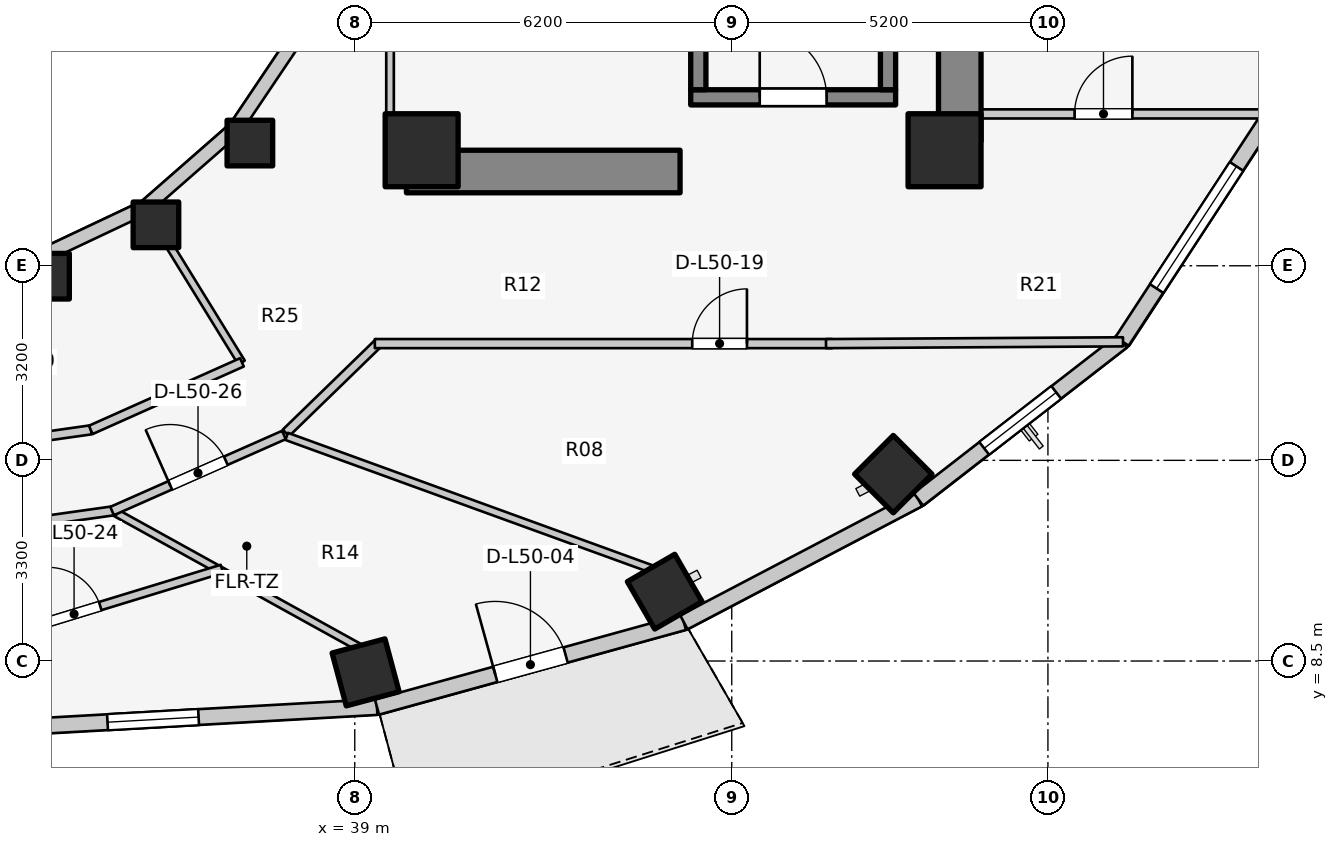
"""IFC4 building model, lengths in metres.
Left out: names, types, materials, properties, quantities, classifications, styles, units other than length and angle.
Written with IfcOpenShell. Run it as: python <this file> out.ifc"""

import sys

from ifc_helpers import new_model, si_unit, direction, frame, frame_2d, origin, origin_2d, place, context, subcontext, project, spatial, rectangle, extrude, element, fill, save


model = new_model("IFC4")
c1 = context("Model", 3, precision=1e-05, world=origin(), true_north=direction((0.0, 1.0)))
c2 = subcontext(c1, "Body", "Model", "MODEL_VIEW")
j1 = project(units=[si_unit("LENGTHUNIT", "METRE"), si_unit("PLANEANGLEUNIT", "RADIAN")], contexts=[c1])
p1 = place(None, origin())
s1 = spatial("IfcSite", under=j1, at=p1, CompositionType="ELEMENT")
p2 = place(p1, origin())
s2 = spatial("IfcBuilding", under=s1, at=p2, CompositionType="ELEMENT")
p3 = place(p2, frame((0.0, 0.0, 165.3)))
s3 = spatial("IfcBuildingStorey", under=s2, at=p3, CompositionType="ELEMENT", Elevation=165.3)
p4 = place(p3, frame((48.95, 17.05, 0.0), z_axis=(0.0, 0.0, 1.0), x_axis=(0.0, 1.0, 0.0)))
e1 = element("IfcWall", 1, at=p4, inside=s3, PredefinedType="SHEAR", context=c2, shape_type="SweptSolid", body=[
    extrude(rectangle(XDim=12.8, YDim=0.7, at=frame_2d((6.4, 0.0))), origin(), (0.0, 0.0, 1.0), 3.1),
])
p5 = place(p3, frame((39.85, 16.55, 0.0), z_axis=(0.0, 0.0, 1.0), x_axis=(1.0, 0.0, 0.0)))
e2 = element("IfcWall", 2, at=p5, inside=s3, PredefinedType="SHEAR", context=c2, shape_type="SweptSolid", body=[
    extrude(rectangle(XDim=4.5, YDim=0.7, at=frame_2d((2.25, 0.0))), origin(), (0.0, 0.0, 1.0), 3.1),
])
p6 = place(p3, frame((44.525, 17.77, 0.0), z_axis=(0.0, 0.0, 1.0), x_axis=(1.0, 0.0, 0.0)))
e3 = element("IfcWall", 3, at=p6, inside=s3, PredefinedType="SOLIDWALL", context=c2, shape_type="SweptSolid", body=[
    extrude(rectangle(XDim=3.37, YDim=0.25, at=frame_2d((1.685, 0.0))), origin(), (0.0, 0.0, 1.0), 3.1),
])
p7 = place(p6, frame((1.135, 0.0, 0.0)))
e4 = element("IfcOpeningElement", 4, at=p7, cuts=e3, PredefinedType="OPENING", context=c2, shape_type="SweptSolid", body=[
    extrude(rectangle(XDim=1.1, YDim=2.1, at=frame_2d((0.55, 1.05))), frame((0.0, 0.135, 0.0), z_axis=(0.0, -1.0, 0.0), x_axis=(1.0, 0.0, 0.0)), (0.0, 0.0, 1.0), 0.27),
])
for number, where, z_axis, x_axis in (
    (5, (44.65, 17.895, 0.0), (0.0, 0.0, 1.0), (0.0, 1.0, 0.0)),
    (6, (47.77, 17.895, 0.0), (0.0, 0.0, 1.0), (0.0, 1.0, 0.0)),
):
    element("IfcWall", number, at=place(p3, frame(where, z_axis=z_axis, x_axis=x_axis)), inside=s3, PredefinedType="SOLIDWALL", context=c2, shape_type="SweptSolid", body=[
        extrude(rectangle(XDim=7.81, YDim=0.25, at=frame_2d((3.905, 0.0))), origin(), (0.0, 0.0, 1.0), 3.1),
    ])
for number, where, z_axis, x_axis in (
    (7, (40.1, 16.9, 0.0), (0.0, 0.0, 1.0), (1.0, 0.0, 0.0)),
    (8, (48.7, 16.9, 0.0), (0.0, 0.0, 1.0), (1.0, 0.0, 0.0)),
):
    element("IfcColumn", number, at=place(p3, frame(where, z_axis=z_axis, x_axis=x_axis)), inside=s3, PredefinedType="COLUMN", context=c2, shape_type="SweptSolid", body=[
        extrude(rectangle(XDim=1.2, YDim=1.2, at=origin_2d()), origin(), (0.0, 0.0, 1.0), 3.1),
    ])
p8 = place(p3, frame((33.931, 14.828, 0.0), z_axis=(0.0, 0.0, 1.0), x_axis=(1.0, 0.0, 0.0)))
e9 = element("IfcColumn", 9, at=p8, inside=s3, PredefinedType="COLUMN", context=c2, shape_type="SweptSolid", body=[
    extrude(rectangle(XDim=0.75, YDim=0.75, at=origin_2d()), origin(), (0.0, 0.0, 1.0), 3.1),
])
p9 = place(p3, frame((39.178, 8.313, 0.0), z_axis=(0.0, 0.0, 1.0), x_axis=(0.258819045103, -0.965925826289, 0.0)))
e10 = element("IfcColumn", 10, at=p9, inside=s3, PredefinedType="COLUMN", context=c2, shape_type="SweptSolid", body=[
    extrude(rectangle(XDim=0.9, YDim=0.9, at=origin_2d()), origin(), (0.0, 0.0, 1.0), 3.1),
])
p10 = place(p3, frame((35.73, 15.673, 0.0), z_axis=(0.0, 0.0, 1.0), x_axis=(1.0, 0.0, 0.0)))
e11 = element("IfcColumn", 11, at=p10, inside=s3, PredefinedType="COLUMN", context=c2, shape_type="SweptSolid", body=[
    extrude(rectangle(XDim=0.75, YDim=0.75, at=origin_2d()), origin(), (0.0, 0.0, 1.0), 3.1),
])
p11 = place(p3, frame((44.098, 9.641, 0.0), z_axis=(0.0, 0.0, 1.0), x_axis=(0.5, -0.866025403784, 0.0)))
e12 = element("IfcColumn", 12, at=p11, inside=s3, PredefinedType="COLUMN", context=c2, shape_type="SweptSolid", body=[
    extrude(rectangle(XDim=0.9, YDim=0.9, at=origin_2d()), origin(), (0.0, 0.0, 1.0), 3.1),
])
p12 = place(p3, frame((37.275, 17.018, 0.0), z_axis=(0.0, 0.0, 1.0), x_axis=(1.0, 0.0, 0.0)))
e13 = element("IfcColumn", 13, at=p12, inside=s3, PredefinedType="COLUMN", context=c2, shape_type="SweptSolid", body=[
    extrude(rectangle(XDim=0.75, YDim=0.75, at=origin_2d()), origin(), (0.0, 0.0, 1.0), 3.1),
])
p13 = place(p3, frame((47.857, 11.573, 0.0), z_axis=(0.0, 0.0, 1.0), x_axis=(0.707106781187, -0.707106781187, 0.0)))
e14 = element("IfcColumn", 14, at=p13, inside=s3, PredefinedType="COLUMN", context=c2, shape_type="SweptSolid", body=[
    extrude(rectangle(XDim=0.9, YDim=0.9, at=origin_2d()), origin(), (0.0, 0.0, 1.0), 3.1),
])
p14 = place(p3, frame((33.843, 15.157, 0.0), z_axis=(0.0, 0.0, 1.0), x_axis=(0.904179699603, 0.427152280606, 0.0)))
e15 = element("IfcWall", 15, at=p14, inside=s3, PredefinedType="STANDARD", context=c2, shape_type="SweptSolid", body=[
    extrude(rectangle(XDim=1.899, YDim=0.23, at=frame_2d((0.95, 0.0))), origin(), (0.0, 0.0, 1.0), 2.16),
])
p15 = place(p3, frame((35.56, 15.968, 0.0), z_axis=(0.0, 0.0, 1.0), x_axis=(0.752576694707, 0.658504607869, 0.0)))
e16 = element("IfcWall", 16, at=p15, inside=s3, PredefinedType="STANDARD", context=c2, shape_type="SweptSolid", body=[
    extrude(rectangle(XDim=1.959, YDim=0.23, at=frame_2d((0.98, 0.0))), origin(), (0.0, 0.0, 1.0), 2.16),
])
p16 = place(p3, frame((37.035, 17.258, 0.0), z_axis=(0.0, 0.0, 1.0), x_axis=(0.558197800898, 0.829707909492, 0.0)))
e17 = element("IfcWall", 17, at=p16, inside=s3, PredefinedType="STANDARD", context=c2, shape_type="SweptSolid", body=[
    extrude(rectangle(XDim=2.027, YDim=0.23, at=frame_2d((1.013, 0.0))), origin(), (0.0, 0.0, 1.0), 2.16),
])
p17 = place(p3, frame((32.0, 7.329, 0.0), z_axis=(0.0, 0.0, 1.0), x_axis=(0.998417906562, 0.056228852534, 0.0)))
e18 = element("IfcWall", 18, at=p17, inside=s3, PredefinedType="STANDARD", context=c2, shape_type="SweptSolid", body=[
    extrude(rectangle(XDim=7.377, YDim=0.26, at=frame_2d((3.688, 0.0))), origin(), (0.0, 0.0, 1.0), 2.85),
])
p18 = place(p17, frame((2.938, 0.0, 0.75)))
e19 = element("IfcOpeningElement", 19, at=p18, cuts=e18, PredefinedType="OPENING", context=c2, shape_type="SweptSolid", body=[
    extrude(rectangle(XDim=1.5, YDim=1.6, at=frame_2d((0.75, 0.8))), frame((0.0, 0.14, 0.0), z_axis=(0.0, -1.0, 0.0), x_axis=(1.0, 0.0, 0.0)), (0.0, 0.0, 1.0), 0.28),
])
p19 = place(p3, frame((39.365, 7.743, 0.0), z_axis=(0.0, 0.0, 1.0), x_axis=(0.963953455704, 0.26607092144, 0.0)))
e20 = element("IfcWall", 20, at=p19, inside=s3, PredefinedType="STANDARD", context=c2, shape_type="SweptSolid", body=[
    extrude(rectangle(XDim=5.237, YDim=0.26, at=frame_2d((2.618, 0.0))), origin(), (0.0, 0.0, 1.0), 2.88),
])
p20 = place(p19, frame((2.018, 0.0, 0.0)))
e21 = element("IfcOpeningElement", 21, at=p20, cuts=e20, PredefinedType="OPENING", context=c2, shape_type="SweptSolid", body=[
    extrude(rectangle(XDim=1.2, YDim=2.2, at=frame_2d((0.6, 1.1))), frame((0.0, 0.14, 0.0), z_axis=(0.0, -1.0, 0.0), x_axis=(1.0, 0.0, 0.0)), (0.0, 0.0, 1.0), 0.28),
])
p21 = place(p3, frame((44.413, 9.137, 0.0), z_axis=(0.0, 0.0, 1.0), x_axis=(0.885660265226, 0.464333818065, 0.0)))
e22 = element("IfcWall", 22, at=p21, inside=s3, PredefinedType="STANDARD", context=c2, shape_type="SweptSolid", body=[
    extrude(rectangle(XDim=4.354, YDim=0.26, at=frame_2d((2.177, 0.0))), origin(), (0.0, 0.0, 1.0), 2.85),
])
p22 = place(p3, frame((48.269, 11.158, 0.0), z_axis=(0.0, 0.0, 1.0), x_axis=(0.790185650662, 0.612867552973, 0.0)))
e23 = element("IfcWall", 23, at=p22, inside=s3, PredefinedType="STANDARD", context=c2, shape_type="SweptSolid", body=[
    extrude(rectangle(XDim=4.239, YDim=0.26, at=frame_2d((2.12, 0.0))), origin(), (0.0, 0.0, 1.0), 2.85),
])
p23 = place(p22, frame((1.37, 0.0, 0.75)))
e24 = element("IfcOpeningElement", 24, at=p23, cuts=e23, PredefinedType="OPENING", context=c2, shape_type="SweptSolid", body=[
    extrude(rectangle(XDim=1.5, YDim=1.6, at=frame_2d((0.75, 0.8))), frame((0.0, 0.14, 0.0), z_axis=(0.0, -1.0, 0.0), x_axis=(1.0, 0.0, 0.0)), (0.0, 0.0, 1.0), 0.28),
])
p24 = place(p3, frame((51.619, 13.757, 0.0), z_axis=(0.0, 0.0, 1.0), x_axis=(0.547456494366, 0.836834145322, 0.0)))
e25 = element("IfcWall", 25, at=p24, inside=s3, PredefinedType="STANDARD", context=c2, shape_type="SweptSolid", body=[
    extrude(rectangle(XDim=4.477, YDim=0.26, at=frame_2d((2.239, 0.0))), origin(), (0.0, 0.0, 1.0), 2.85),
])
p25 = place(p24, frame((1.039, 0.0, 0.75)))
e26 = element("IfcOpeningElement", 26, at=p25, cuts=e25, PredefinedType="OPENING", context=c2, shape_type="SweptSolid", body=[
    extrude(rectangle(XDim=2.4, YDim=1.7, at=frame_2d((1.2, 0.85))), frame((0.0, 0.14, 0.0), z_axis=(0.0, -1.0, 0.0), x_axis=(1.0, 0.0, 0.0)), (0.0, 0.0, 1.0), 0.28),
])
p26 = place(p3, frame((39.58, 17.1, 0.0), z_axis=(0.0, 0.0, 1.0), x_axis=(0.0, 1.0, 0.0)))
e27 = element("IfcWall", 27, at=p26, inside=s3, PredefinedType="PARTITIONING", context=c2, shape_type="SweptSolid", body=[
    extrude(rectangle(XDim=2.04, YDim=0.125, at=frame_2d((1.02, 0.0))), origin(), (0.0, 0.0, 1.0), 2.232),
])
p27 = place(p3, frame((48.95, 17.497, 0.0), z_axis=(0.0, 0.0, 1.0), x_axis=(1.0, 0.0, 0.0)))
e28 = element("IfcWall", 28, at=p27, inside=s3, PredefinedType="PARTITIONING", context=c2, shape_type="SweptSolid", body=[
    extrude(rectangle(XDim=5.14, YDim=0.15, at=frame_2d((2.57, 0.0))), origin(), (0.0, 0.0, 1.0), 2.855),
])
p28 = place(p27, frame((1.889, 0.0, 0.0)))
e29 = element("IfcOpeningElement", 29, at=p28, cuts=e28, PredefinedType="OPENING", context=c2, shape_type="SweptSolid", body=[
    extrude(rectangle(XDim=0.95, YDim=2.1, at=frame_2d((0.475, 1.05))), frame((0.0, 0.085, 0.0), z_axis=(0.0, -1.0, 0.0), x_axis=(1.0, 0.0, 0.0)), (0.0, 0.0, 1.0), 0.17),
])
p29 = place(p3, frame((37.867, 12.251, 0.0), z_axis=(0.0, 0.0, 1.0), x_axis=(0.717419568599, 0.696641344302, 0.0)))
e30 = element("IfcWall", 30, at=p29, inside=s3, PredefinedType="PARTITIONING", context=c2, shape_type="SweptSolid", body=[
    extrude(rectangle(XDim=2.138, YDim=0.15, at=frame_2d((1.069, 0.0))), origin(), (0.0, 0.0, 1.0), 2.299),
])
p30 = place(p3, frame((39.33, 13.72, 0.0), z_axis=(0.0, 0.0, 1.0), x_axis=(1.0, 0.0, 0.0)))
e31 = element("IfcWall", 31, at=p30, inside=s3, PredefinedType="PARTITIONING", context=c2, shape_type="SweptSolid", body=[
    extrude(rectangle(XDim=7.52, YDim=0.15, at=frame_2d((3.76, 0.0))), origin(), (0.0, 0.0, 1.0), 2.299),
])
p31 = place(p30, frame((5.22, 0.0, 0.0)))
e32 = element("IfcOpeningElement", 32, at=p31, cuts=e31, PredefinedType="OPENING", context=c2, shape_type="SweptSolid", body=[
    extrude(rectangle(XDim=0.9, YDim=2.1, at=frame_2d((0.45, 1.05))), frame((0.0, 0.085, 0.0), z_axis=(0.0, -1.0, 0.0), x_axis=(1.0, 0.0, 0.0)), (0.0, 0.0, 1.0), 0.17),
])
p32 = place(p3, frame((46.75, 13.72, 0.0), z_axis=(0.0, 0.0, 1.0), x_axis=(0.999981712056, 0.006047772638, 0.0)))
e33 = element("IfcWall", 33, at=p32, inside=s3, PredefinedType="PARTITIONING", context=c2, shape_type="SweptSolid", body=[
    extrude(rectangle(XDim=4.885, YDim=0.15, at=frame_2d((2.442, 0.0))), origin(), (0.0, 0.0, 1.0), 2.22),
])
p33 = place(p3, frame((35.55, 15.985, 0.0), z_axis=(0.0, 0.0, 1.0), x_axis=(0.524565340045, -0.851370192116, 0.0)))
e34 = element("IfcWall", 34, at=p33, inside=s3, PredefinedType="PARTITIONING", context=c2, shape_type="SweptSolid", body=[
    extrude(rectangle(XDim=3.027, YDim=0.125, at=frame_2d((1.514, 0.0))), origin(), (0.0, 0.0, 1.0), 2.299),
])
p34 = place(p3, frame((31.998, 11.924, 0.0), z_axis=(0.0, 0.0, 1.0), x_axis=(0.990079774468, 0.140506370634, 0.0)))
e35 = element("IfcWall", 35, at=p34, inside=s3, PredefinedType="PARTITIONING", context=c2, shape_type="SweptSolid", body=[
    extrude(rectangle(XDim=2.69, YDim=0.15, at=frame_2d((1.345, 0.0))), origin(), (0.0, 0.0, 1.0), 2.299),
])
p35 = place(p34, frame((0.87, 0.0, 0.0)))
e36 = element("IfcOpeningElement", 36, at=p35, cuts=e35, PredefinedType="OPENING", context=c2, shape_type="SweptSolid", body=[
    extrude(rectangle(XDim=0.95, YDim=2.1, at=frame_2d((0.475, 1.05))), frame((0.0, 0.085, 0.0), z_axis=(0.0, -1.0, 0.0), x_axis=(1.0, 0.0, 0.0)), (0.0, 0.0, 1.0), 0.17),
])
p36 = place(p3, frame((34.658, 12.301, 0.0), z_axis=(0.0, 0.0, 1.0), x_axis=(0.912985265053, 0.407992531545, 0.0)))
e37 = element("IfcWall", 37, at=p36, inside=s3, PredefinedType="PARTITIONING", context=c2, shape_type="SweptSolid", body=[
    extrude(rectangle(XDim=2.723, YDim=0.15, at=frame_2d((1.362, 0.0))), origin(), (0.0, 0.0, 1.0), 2.299),
])
p37 = place(p3, frame((35.065, 10.942, 0.0), z_axis=(0.0, 0.0, 1.0), x_axis=(0.875077338582, -0.48398311076, 0.0)))
e38 = element("IfcWall", 38, at=p37, inside=s3, PredefinedType="PARTITIONING", context=c2, shape_type="SweptSolid", body=[
    extrude(rectangle(XDim=4.573, YDim=0.125, at=frame_2d((2.287, 0.0))), origin(), (0.0, 0.0, 1.0), 2.299),
])
p38 = place(p3, frame((37.88, 12.194, 0.0), z_axis=(0.0, 0.0, 1.0), x_axis=(0.939901628116, -0.341445353557, 0.0)))
e39 = element("IfcWall", 39, at=p38, inside=s3, PredefinedType="PARTITIONING", context=c2, shape_type="SweptSolid", body=[
    extrude(rectangle(XDim=6.387, YDim=0.125, at=frame_2d((3.194, 0.0))), origin(), (0.0, 0.0, 1.0), 2.299),
])
p39 = place(p3, frame((31.95, 10.537, 0.0), z_axis=(0.0, 0.0, 1.0), x_axis=(0.990254405439, 0.139270285808, 0.0)))
e40 = element("IfcWall", 40, at=p39, inside=s3, PredefinedType="PARTITIONING", context=c2, shape_type="SweptSolid", body=[
    extrude(rectangle(XDim=3.147, YDim=0.15, at=frame_2d((1.573, 0.0))), origin(), (0.0, 0.0, 1.0), 2.299),
])
p40 = place(p3, frame((31.952, 8.529, 0.0), z_axis=(0.0, 0.0, 1.0), x_axis=(0.956348216259, 0.292229514694, 0.0)))
e41 = element("IfcWall", 41, at=p40, inside=s3, PredefinedType="PLUMBINGWALL", context=c2, shape_type="SweptSolid", body=[
    extrude(rectangle(XDim=5.084, YDim=0.14, at=frame_2d((2.542, 0.0))), origin(), (0.0, 0.0, 1.0), 2.299),
])
p41 = place(p40, frame((2.092, 0.0, 0.0)))
e42 = element("IfcOpeningElement", 42, at=p41, cuts=e41, PredefinedType="OPENING", context=c2, shape_type="SweptSolid", body=[
    extrude(rectangle(XDim=0.9, YDim=2.1, at=frame_2d((0.45, 1.05))), frame((0.0, 0.08, 0.0), z_axis=(0.0, -1.0, 0.0), x_axis=(1.0, 0.0, 0.0)), (0.0, 0.0, 1.0), 0.16),
])
p42 = place(p3, frame((35.009, 10.966, 0.0), z_axis=(0.0, 0.0, 1.0), x_axis=(0.91445214467, 0.404694051239, 0.0)))
e43 = element("IfcWall", 43, at=p42, inside=s3, PredefinedType="PARTITIONING", context=c2, shape_type="SweptSolid", body=[
    extrude(rectangle(XDim=3.091, YDim=0.15, at=frame_2d((1.545, 0.0))), origin(), (0.0, 0.0, 1.0), 2.299),
])
p43 = place(p42, frame((1.045, 0.0, 0.0)))
e44 = element("IfcOpeningElement", 44, at=p43, cuts=e43, PredefinedType="OPENING", context=c2, shape_type="SweptSolid", body=[
    extrude(rectangle(XDim=1.0, YDim=2.1, at=frame_2d((0.5, 1.05))), frame((0.0, 0.085, 0.0), z_axis=(0.0, -1.0, 0.0), x_axis=(1.0, 0.0, 0.0)), (0.0, 0.0, 1.0), 0.17),
])
p44 = place(p18, origin())
e45 = element("IfcWindow", 45, at=p44, inside=s3, PartitioningType="SINGLE_PANEL", PredefinedType="WINDOW", context=c2, shape_type="SweptSolid", body=[
    extrude(rectangle(XDim=1.5, YDim=1.6, at=frame_2d((0.75, 0.8))), frame((0.0, 0.03, 0.0), z_axis=(0.0, -1.0, 0.0), x_axis=(1.0, 0.0, 0.0)), (0.0, 0.0, 1.0), 0.06),
])
fill(e19, e45)
p45 = place(p20, origin())
e46 = element("IfcDoor", 46, at=p45, inside=s3, OperationType="SINGLE_SWING_LEFT", PredefinedType="DOOR", context=c2, shape_type="SweptSolid", body=[
    extrude(rectangle(XDim=1.2, YDim=2.2, at=frame_2d((0.6, 1.1))), frame((0.0, 0.025, 0.0), z_axis=(0.0, -1.0, 0.0), x_axis=(1.0, 0.0, 0.0)), (0.0, 0.0, 1.0), 0.05),
])
fill(e21, e46)
p46 = place(p23, origin())
e47 = element("IfcWindow", 47, at=p46, inside=s3, PartitioningType="SINGLE_PANEL", PredefinedType="WINDOW", context=c2, shape_type="SweptSolid", body=[
    extrude(rectangle(XDim=1.5, YDim=1.6, at=frame_2d((0.75, 0.8))), frame((0.0, 0.03, 0.0), z_axis=(0.0, -1.0, 0.0), x_axis=(1.0, 0.0, 0.0)), (0.0, 0.0, 1.0), 0.06),
])
fill(e24, e47)
p47 = place(p25, origin())
e48 = element("IfcWindow", 48, at=p47, inside=s3, PartitioningType="SINGLE_PANEL", PredefinedType="WINDOW", context=c2, shape_type="SweptSolid", body=[
    extrude(rectangle(XDim=2.4, YDim=1.7, at=frame_2d((1.2, 0.85))), frame((0.0, 0.03, 0.0), z_axis=(0.0, -1.0, 0.0), x_axis=(1.0, 0.0, 0.0)), (0.0, 0.0, 1.0), 0.06),
])
fill(e26, e48)
p48 = place(p7, origin())
e49 = element("IfcDoor", 49, at=p48, inside=s3, OperationType="SINGLE_SWING_LEFT", PredefinedType="DOOR", context=c2, shape_type="SweptSolid", body=[
    extrude(rectangle(XDim=1.1, YDim=2.1, at=frame_2d((0.55, 1.05))), frame((0.0, 0.025, 0.0), z_axis=(0.0, -1.0, 0.0), x_axis=(1.0, 0.0, 0.0)), (0.0, 0.0, 1.0), 0.05),
])
fill(e4, e49)
p49 = place(p28, origin())
e50 = element("IfcDoor", 50, at=p49, inside=s3, OperationType="SINGLE_SWING_RIGHT", PredefinedType="DOOR", context=c2, shape_type="SweptSolid", body=[
    extrude(rectangle(XDim=0.95, YDim=2.1, at=frame_2d((0.475, 1.05))), frame((0.0, 0.025, 0.0), z_axis=(0.0, -1.0, 0.0), x_axis=(1.0, 0.0, 0.0)), (0.0, 0.0, 1.0), 0.05),
])
fill(e29, e50)
p50 = place(p31, origin())
e51 = element("IfcDoor", 51, at=p50, inside=s3, OperationType="SINGLE_SWING_RIGHT", PredefinedType="DOOR", context=c2, shape_type="SweptSolid", body=[
    extrude(rectangle(XDim=0.9, YDim=2.1, at=frame_2d((0.45, 1.05))), frame((0.0, 0.025, 0.0), z_axis=(0.0, -1.0, 0.0), x_axis=(1.0, 0.0, 0.0)), (0.0, 0.0, 1.0), 0.05),
])
fill(e32, e51)
p51 = place(p41, origin())
e52 = element("IfcDoor", 52, at=p51, inside=s3, OperationType="SINGLE_SWING_LEFT", PredefinedType="DOOR", context=c2, shape_type="SweptSolid", body=[
    extrude(rectangle(XDim=0.9, YDim=2.1, at=frame_2d((0.45, 1.05))), frame((0.0, 0.025, 0.0), z_axis=(0.0, -1.0, 0.0), x_axis=(1.0, 0.0, 0.0)), (0.0, 0.0, 1.0), 0.05),
])
fill(e42, e52)
p52 = place(p43, origin())
e53 = element("IfcDoor", 53, at=p52, inside=s3, OperationType="SINGLE_SWING_LEFT", PredefinedType="DOOR", context=c2, shape_type="SweptSolid", body=[
    extrude(rectangle(XDim=1.0, YDim=2.1, at=frame_2d((0.5, 1.05))), frame((0.0, 0.025, 0.0), z_axis=(0.0, -1.0, 0.0), x_axis=(1.0, 0.0, 0.0)), (0.0, 0.0, 1.0), 0.05),
])
fill(e44, e53)
save(model, sys.argv[1])
